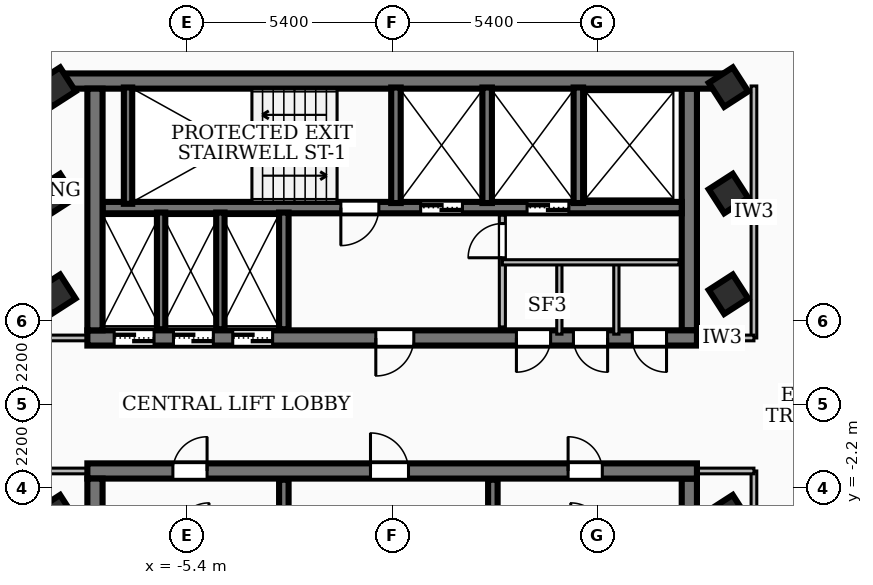
"""IFC4 building model, lengths in metres.
Left out: names, types, materials, properties, quantities, classifications, styles, units other than length and angle.
Written with IfcOpenShell. Run it as: python <this file> out.ifc"""

import sys

from ifc_helpers import new_model, si_unit, direction, frame, frame_2d, origin, origin_2d, place, context, subcontext, project, spatial, rectangle, extrude, element, fill, save


model = new_model("IFC4")
c1 = context("Model", 3, precision=1e-05, world=origin(), true_north=direction((0.0, 1.0)))
c2 = subcontext(c1, "Body", "Model", "MODEL_VIEW")
j1 = project(units=[si_unit("LENGTHUNIT", "METRE"), si_unit("PLANEANGLEUNIT", "RADIAN")], contexts=[c1])
p1 = place(None, origin())
s1 = spatial("IfcSite", under=j1, at=p1, CompositionType="ELEMENT")
p2 = place(p1, origin())
s2 = spatial("IfcBuilding", under=s1, at=p2, CompositionType="ELEMENT")
p3 = place(p2, frame((0.0, 0.0, 215.46)))
s3 = spatial("IfcBuildingStorey", under=s2, at=p3, CompositionType="ELEMENT", Elevation=215.46)
p4 = place(p3, frame((-8.78, 8.51, 0.0), z_axis=(0.0, 0.0, 1.0), x_axis=(1.0, 0.0, 0.0)))
e1 = element("IfcWall", 1, at=p4, inside=s3, PredefinedType="SHEAR", context=c2, shape_type="SweptSolid", body=[
    extrude(rectangle(XDim=17.56, YDim=0.4, at=frame_2d((8.78, 0.0))), origin(), (0.0, 0.0, 1.0), 3.16),
])
p5 = place(p3, frame((8.02, 1.75, 0.0), z_axis=(0.0, 0.0, 1.0), x_axis=(-1.0, 0.0, 0.0)))
e2 = element("IfcWall", 2, at=p5, inside=s3, PredefinedType="SHEAR", context=c2, shape_type="SweptSolid", body=[
    extrude(rectangle(XDim=16.04, YDim=0.4, at=frame_2d((8.02, 0.0))), origin(), (0.0, 0.0, 1.0), 3.16),
])
p6 = place(p5, frame((7.45, 0.0, 0.0)))
e3 = element("IfcOpeningElement", 3, at=p6, cuts=e2, PredefinedType="OPENING", context=c2, shape_type="SweptSolid", body=[
    extrude(rectangle(XDim=1.0, YDim=2.1, at=frame_2d((0.5, 1.05))), frame((0.0, 0.21, 0.0), z_axis=(0.0, -1.0, 0.0), x_axis=(1.0, 0.0, 0.0)), (0.0, 0.0, 1.0), 0.42),
])
p7 = place(p5, frame((14.285, 0.0, 0.0)))
e4 = element("IfcOpeningElement", 4, at=p7, cuts=e2, PredefinedType="OPENING", context=c2, shape_type="SweptSolid", body=[
    extrude(rectangle(XDim=1.05, YDim=2.15, at=frame_2d((0.525, 1.075))), frame((0.0, 0.21, 0.0), z_axis=(0.0, -1.0, 0.0), x_axis=(1.0, 0.0, 0.0)), (0.0, 0.0, 1.0), 0.42),
])
p8 = place(p5, frame((12.725, 0.0, 0.0)))
e5 = element("IfcOpeningElement", 5, at=p8, cuts=e2, PredefinedType="OPENING", context=c2, shape_type="SweptSolid", body=[
    extrude(rectangle(XDim=1.05, YDim=2.15, at=frame_2d((0.525, 1.075))), frame((0.0, 0.21, 0.0), z_axis=(0.0, -1.0, 0.0), x_axis=(1.0, 0.0, 0.0)), (0.0, 0.0, 1.0), 0.42),
])
p9 = place(p5, frame((11.165, 0.0, 0.0)))
e6 = element("IfcOpeningElement", 6, at=p9, cuts=e2, PredefinedType="OPENING", context=c2, shape_type="SweptSolid", body=[
    extrude(rectangle(XDim=1.05, YDim=2.15, at=frame_2d((0.525, 1.075))), frame((0.0, 0.21, 0.0), z_axis=(0.0, -1.0, 0.0), x_axis=(1.0, 0.0, 0.0)), (0.0, 0.0, 1.0), 0.42),
])
p10 = place(p5, frame((3.85, 0.0, 0.0)))
e7 = element("IfcOpeningElement", 7, at=p10, cuts=e2, PredefinedType="OPENING", context=c2, shape_type="SweptSolid", body=[
    extrude(rectangle(XDim=0.9, YDim=2.06, at=frame_2d((0.45, 1.03))), frame((0.0, 0.21, 0.0), z_axis=(0.0, -1.0, 0.0), x_axis=(1.0, 0.0, 0.0)), (0.0, 0.0, 1.0), 0.42),
])
p11 = place(p5, frame((2.35, 0.0, 0.0)))
e8 = element("IfcOpeningElement", 8, at=p11, cuts=e2, PredefinedType="OPENING", context=c2, shape_type="SweptSolid", body=[
    extrude(rectangle(XDim=0.9, YDim=2.06, at=frame_2d((0.45, 1.03))), frame((0.0, 0.21, 0.0), z_axis=(0.0, -1.0, 0.0), x_axis=(1.0, 0.0, 0.0)), (0.0, 0.0, 1.0), 0.42),
])
p12 = place(p5, frame((0.8, 0.0, 0.0)))
e9 = element("IfcOpeningElement", 9, at=p12, cuts=e2, PredefinedType="OPENING", context=c2, shape_type="SweptSolid", body=[
    extrude(rectangle(XDim=0.9, YDim=2.06, at=frame_2d((0.45, 1.03))), frame((0.0, 0.21, 0.0), z_axis=(0.0, -1.0, 0.0), x_axis=(1.0, 0.0, 0.0)), (0.0, 0.0, 1.0), 0.42),
])
for number, where, z_axis, x_axis in (
    (10, (-7.82, 1.95, 0.0), (0.0, 0.0, 1.0), (0.0, 1.0, 0.0)),
    (11, (7.82, 8.31, 0.0), (0.0, 0.0, 1.0), (0.0, -1.0, 0.0)),
):
    element("IfcWall", number, at=place(p3, frame(where, z_axis=z_axis, x_axis=x_axis)), inside=s3, PredefinedType="SHEAR", context=c2, shape_type="SweptSolid", body=[
        extrude(rectangle(XDim=6.36, YDim=0.4, at=frame_2d((3.18, 0.0))), origin(), (0.0, 0.0, 1.0), 3.16),
    ])
p13 = place(p3, frame((7.62, 5.18, 0.0), z_axis=(0.0, 0.0, 1.0), x_axis=(-1.0, 0.0, 0.0)))
e12 = element("IfcWall", 12, at=p13, inside=s3, PredefinedType="SOLIDWALL", context=c2, shape_type="SweptSolid", body=[
    extrude(rectangle(XDim=15.24, YDim=0.3, at=frame_2d((7.62, 0.0))), origin(), (0.0, 0.0, 1.0), 3.16),
])
p14 = place(p13, frame((5.77, 0.0, 0.0)))
e13 = element("IfcOpeningElement", 13, at=p14, cuts=e12, PredefinedType="OPENING", context=c2, shape_type="SweptSolid", body=[
    extrude(rectangle(XDim=1.1, YDim=2.15, at=frame_2d((0.55, 1.075))), frame((0.0, 0.16, 0.0), z_axis=(0.0, -1.0, 0.0), x_axis=(1.0, 0.0, 0.0)), (0.0, 0.0, 1.0), 0.32),
])
p15 = place(p13, frame((2.97, 0.0, 0.0)))
e14 = element("IfcOpeningElement", 14, at=p15, cuts=e12, PredefinedType="OPENING", context=c2, shape_type="SweptSolid", body=[
    extrude(rectangle(XDim=1.1, YDim=2.15, at=frame_2d((0.55, 1.075))), frame((0.0, 0.16, 0.0), z_axis=(0.0, -1.0, 0.0), x_axis=(1.0, 0.0, 0.0)), (0.0, 0.0, 1.0), 0.32),
])
p16 = place(p13, frame((7.97, 0.0, 0.0)))
e15 = element("IfcOpeningElement", 15, at=p16, cuts=e12, PredefinedType="OPENING", context=c2, shape_type="SweptSolid", body=[
    extrude(rectangle(XDim=1.0, YDim=2.1, at=frame_2d((0.5, 1.05))), frame((0.0, 0.16, 0.0), z_axis=(0.0, -1.0, 0.0), x_axis=(1.0, 0.0, 0.0)), (0.0, 0.0, 1.0), 0.32),
])
p17 = place(p3, frame((-8.02, -1.75, 0.0), z_axis=(0.0, 0.0, 1.0), x_axis=(1.0, 0.0, 0.0)))
e16 = element("IfcWall", 16, at=p17, inside=s3, PredefinedType="SHEAR", context=c2, shape_type="SweptSolid", body=[
    extrude(rectangle(XDim=16.04, YDim=0.4, at=frame_2d((8.02, 0.0))), origin(), (0.0, 0.0, 1.0), 3.16),
])
p18 = place(p17, frame((7.45, 0.0, 0.0)))
e17 = element("IfcOpeningElement", 17, at=p18, cuts=e16, PredefinedType="OPENING", context=c2, shape_type="SweptSolid", body=[
    extrude(rectangle(XDim=1.0, YDim=2.1, at=frame_2d((0.5, 1.05))), frame((0.0, 0.21, 0.0), z_axis=(0.0, -1.0, 0.0), x_axis=(1.0, 0.0, 0.0)), (0.0, 0.0, 1.0), 0.42),
])
p19 = place(p17, frame((12.65, 0.0, 0.0)))
e18 = element("IfcOpeningElement", 18, at=p19, cuts=e16, PredefinedType="OPENING", context=c2, shape_type="SweptSolid", body=[
    extrude(rectangle(XDim=0.9, YDim=2.06, at=frame_2d((0.45, 1.03))), frame((0.0, 0.21, 0.0), z_axis=(0.0, -1.0, 0.0), x_axis=(1.0, 0.0, 0.0)), (0.0, 0.0, 1.0), 0.42),
])
p20 = place(p17, frame((2.25, 0.0, 0.0)))
e19 = element("IfcOpeningElement", 19, at=p20, cuts=e16, PredefinedType="OPENING", context=c2, shape_type="SweptSolid", body=[
    extrude(rectangle(XDim=0.9, YDim=2.06, at=frame_2d((0.45, 1.03))), frame((0.0, 0.21, 0.0), z_axis=(0.0, -1.0, 0.0), x_axis=(1.0, 0.0, 0.0)), (0.0, 0.0, 1.0), 0.42),
])
for number, where, z_axis, x_axis in (
    (20, (-7.82, -8.31, 0.0), (0.0, 0.0, 1.0), (0.0, 1.0, 0.0)),
    (21, (7.82, -1.95, 0.0), (0.0, 0.0, 1.0), (0.0, -1.0, 0.0)),
):
    element("IfcWall", number, at=place(p3, frame(where, z_axis=z_axis, x_axis=x_axis)), inside=s3, PredefinedType="SHEAR", context=c2, shape_type="SweptSolid", body=[
        extrude(rectangle(XDim=6.36, YDim=0.4, at=frame_2d((3.18, 0.0))), origin(), (0.0, 0.0, 1.0), 3.16),
    ])
p21 = place(p3, frame((-6.95, 5.28, 0.0), z_axis=(0.0, 0.0, 1.0), x_axis=(0.0, 1.0, 0.0)))
e22 = element("IfcWall", 22, at=p21, inside=s3, PredefinedType="SOLIDWALL", context=c2, shape_type="SweptSolid", body=[
    extrude(rectangle(XDim=3.06, YDim=0.22, at=frame_2d((1.53, 0.0))), origin(), (0.0, 0.0, 1.0), 3.16),
])
for number, where, z_axis, x_axis in (
    (23, (0.1, 5.3, 0.0), (0.0, 0.0, 1.0), (0.0, 1.0, 0.0)),
    (24, (2.5, 5.3, 0.0), (0.0, 0.0, 1.0), (0.0, 1.0, 0.0)),
    (25, (4.9, 5.3, 0.0), (0.0, 0.0, 1.0), (0.0, 1.0, 0.0)),
):
    element("IfcWall", number, at=place(p3, frame(where, z_axis=z_axis, x_axis=x_axis)), inside=s3, PredefinedType="SOLIDWALL", context=c2, shape_type="SweptSolid", body=[
        extrude(rectangle(XDim=3.04, YDim=0.25, at=frame_2d((1.52, 0.0))), origin(), (0.0, 0.0, 1.0), 3.16),
    ])
for number, where, z_axis, x_axis in (
    (26, (-2.85, 1.98, 0.0), (0.0, 0.0, 1.0), (0.0, 1.0, 0.0)),
    (27, (-2.85, -5.05, 0.0), (0.0, 0.0, 1.0), (0.0, 1.0, 0.0)),
    (28, (2.65, -5.05, 0.0), (0.0, 0.0, 1.0), (0.0, 1.0, 0.0)),
):
    element("IfcWall", number, at=place(p3, frame(where, z_axis=z_axis, x_axis=x_axis)), inside=s3, PredefinedType="SOLIDWALL", context=c2, shape_type="SweptSolid", body=[
        extrude(rectangle(XDim=3.07, YDim=0.25, at=frame_2d((1.535, 0.0))), origin(), (0.0, 0.0, 1.0), 3.16),
    ])
for number, where, z_axis, x_axis in (
    (29, (-6.08, 1.98, 0.0), (0.0, 0.0, 1.0), (0.0, 1.0, 0.0)),
    (30, (-4.52, 1.98, 0.0), (0.0, 0.0, 1.0), (0.0, 1.0, 0.0)),
):
    element("IfcWall", number, at=place(p3, frame(where, z_axis=z_axis, x_axis=x_axis)), inside=s3, PredefinedType="SOLIDWALL", context=c2, shape_type="SweptSolid", body=[
        extrude(rectangle(XDim=3.07, YDim=0.22, at=frame_2d((1.535, 0.0))), origin(), (0.0, 0.0, 1.0), 3.16),
    ])
for number, where, z_axis, x_axis in (
    (31, (-8.85, -2.9, 0.0), (0.0, 0.0, 1.0), (0.841, 0.542, 0.0)),
    (32, (-8.85, 2.9, 0.0), (0.0, 0.0, 1.0), (0.841, 0.542, 0.0)),
    (33, (-8.85, 5.55, 0.0), (0.0, 0.0, 1.0), (0.841, 0.542, 0.0)),
    (34, (8.85, -2.9, 0.0), (0.0, 0.0, 1.0), (0.841, 0.542, 0.0)),
    (35, (8.85, 2.9, 0.0), (0.0, 0.0, 1.0), (0.841, 0.542, 0.0)),
    (36, (8.85, 5.55, 0.0), (0.0, 0.0, 1.0), (0.841, 0.542, 0.0)),
    (37, (-8.85, 8.35, 0.0), (0.0, 0.0, 1.0), (0.841, 0.542, 0.0)),
    (38, (8.85, 8.35, 0.0), (0.0, 0.0, 1.0), (0.841, 0.542, 0.0)),
):
    element("IfcColumn", number, at=place(p3, frame(where, z_axis=z_axis, x_axis=x_axis)), inside=s3, PredefinedType="COLUMN", context=c2, shape_type="SweptSolid", body=[
        extrude(rectangle(XDim=0.75, YDim=0.75, at=origin_2d()), origin(), (0.0, 0.0, 1.0), 3.42),
    ])
p22 = place(p3, frame((2.9, 2.04, 0.0), z_axis=(0.0, 0.0, 1.0), x_axis=(0.0, 1.0, 0.0)))
e39 = element("IfcWall", 39, at=p22, inside=s3, PredefinedType="PARTITIONING", context=c2, shape_type="SweptSolid", body=[
    extrude(rectangle(XDim=2.94, YDim=0.16, at=frame_2d((1.47, 0.0))), origin(), (0.0, 0.0, 1.0), 2.39),
])
p23 = place(p22, frame((1.82, 0.0, 0.0)))
e40 = element("IfcOpeningElement", 40, at=p23, cuts=e39, PredefinedType="OPENING", context=c2, shape_type="SweptSolid", body=[
    extrude(rectangle(XDim=0.9, YDim=2.06, at=frame_2d((0.45, 1.03))), frame((0.0, 0.09, 0.0), z_axis=(0.0, -1.0, 0.0), x_axis=(1.0, 0.0, 0.0)), (0.0, 0.0, 1.0), 0.18),
])
p24 = place(p3, frame((2.9, 3.74, 0.0), z_axis=(0.0, 0.0, 1.0), x_axis=(1.0, 0.0, 0.0)))
e41 = element("IfcWall", 41, at=p24, inside=s3, PredefinedType="PARTITIONING", context=c2, shape_type="SweptSolid", body=[
    extrude(rectangle(XDim=4.65, YDim=0.138, at=frame_2d((2.325, 0.0))), origin(), (0.0, 0.0, 1.0), 3.16),
])
for number, where, z_axis, x_axis in (
    (42, (4.4, 1.85, 0.0), (0.0, 0.0, 1.0), (0.0, 1.0, 0.0)),
    (43, (5.9, 1.85, 0.0), (0.0, 0.0, 1.0), (0.0, 1.0, 0.0)),
):
    element("IfcWall", number, at=place(p3, frame(where, z_axis=z_axis, x_axis=x_axis)), inside=s3, PredefinedType="PARTITIONING", context=c2, shape_type="SweptSolid", body=[
        extrude(rectangle(XDim=1.89, YDim=0.138, at=frame_2d((0.945, 0.0))), origin(), (0.0, 0.0, 1.0), 2.39),
    ])
for number, where, z_axis, x_axis in (
    (44, (-7.85, 1.75, 0.0), (0.0, 0.0, 1.0), (-1.0, 0.0, 0.0)),
    (45, (-7.85, -1.75, 0.0), (0.0, 0.0, 1.0), (-1.0, 0.0, 0.0)),
):
    element("IfcWall", number, at=place(p3, frame(where, z_axis=z_axis, x_axis=x_axis)), inside=s3, PredefinedType="PARTITIONING", context=c2, shape_type="SweptSolid", body=[
        extrude(rectangle(XDim=1.67, YDim=0.15, at=frame_2d((0.835, 0.0))), origin(), (0.0, 0.0, 1.0), 2.39),
    ])
p25 = place(p3, frame((9.52, 1.75, 0.0), z_axis=(0.0, 0.0, 1.0), x_axis=(0.0, 1.0, 0.0)))
e46 = element("IfcWall", 46, at=p25, inside=s3, PredefinedType="PARTITIONING", context=c2, shape_type="SweptSolid", body=[
    extrude(rectangle(XDim=6.63, YDim=0.15, at=frame_2d((3.315, 0.0))), origin(), (0.0, 0.0, 1.0), 2.53),
])
p26 = place(p3, frame((7.85, 1.75, 0.0), z_axis=(0.0, 0.0, 1.0), x_axis=(1.0, 0.0, 0.0)))
e47 = element("IfcWall", 47, at=p26, inside=s3, PredefinedType="PARTITIONING", context=c2, shape_type="SweptSolid", body=[
    extrude(rectangle(XDim=1.67, YDim=0.15, at=frame_2d((0.835, 0.0))), origin(), (0.0, 0.0, 1.0), 2.39),
])
p27 = place(p3, frame((9.52, -8.38, 0.0), z_axis=(0.0, 0.0, 1.0), x_axis=(0.0, 1.0, 0.0)))
e48 = element("IfcWall", 48, at=p27, inside=s3, PredefinedType="PARTITIONING", context=c2, shape_type="SweptSolid", body=[
    extrude(rectangle(XDim=6.63, YDim=0.15, at=frame_2d((3.315, 0.0))), origin(), (0.0, 0.0, 1.0), 3.16),
])
p28 = place(p3, frame((7.85, -1.75, 0.0), z_axis=(0.0, 0.0, 1.0), x_axis=(1.0, 0.0, 0.0)))
e49 = element("IfcWall", 49, at=p28, inside=s3, PredefinedType="PARTITIONING", context=c2, shape_type="SweptSolid", body=[
    extrude(rectangle(XDim=1.67, YDim=0.15, at=frame_2d((0.835, 0.0))), origin(), (0.0, 0.0, 1.0), 2.39),
])
p29 = place(p3, frame((11.27, 8.893, 0.0), z_axis=(0.0, 0.0, 1.0), x_axis=(-0.541761070726, 0.840532534912, 0.0)))
e50 = element("IfcWall", 50, at=p29, inside=s3, PredefinedType="PARTITIONING", context=c2, shape_type="SweptSolid", body=[
    extrude(rectangle(XDim=8.149, YDim=0.1, at=frame_2d((4.075, 0.0))), origin(), (0.0, 0.0, 1.0), 2.53),
])
p30 = place(p3, frame((10.449, 14.152, 0.0), z_axis=(0.0, 0.0, 1.0), x_axis=(0.541734007753, -0.8405499776, 0.0)))
e51 = element("IfcWall", 51, at=p30, inside=s3, PredefinedType="PARTITIONING", context=c2, shape_type="SweptSolid", body=[
    extrude(rectangle(XDim=12.67, YDim=0.1, at=frame_2d((6.335, 0.0))), origin(), (0.0, 0.0, 1.0), 2.53),
])
p31 = place(p30, frame((6.405, 0.0, 0.0)))
e52 = element("IfcOpeningElement", 52, at=p31, cuts=e51, PredefinedType="OPENING", context=c2, shape_type="SweptSolid", body=[
    extrude(rectangle(XDim=0.86, YDim=2.04, at=frame_2d((0.43, 1.02))), frame((0.0, 0.06, 0.0), z_axis=(0.0, -1.0, 0.0), x_axis=(1.0, 0.0, 0.0)), (0.0, 0.0, 1.0), 0.12),
])
p32 = place(p30, frame((5.205, 0.0, 0.0)))
e53 = element("IfcOpeningElement", 53, at=p32, cuts=e51, PredefinedType="OPENING", context=c2, shape_type="SweptSolid", body=[
    extrude(rectangle(XDim=0.86, YDim=2.04, at=frame_2d((0.43, 1.02))), frame((0.0, 0.06, 0.0), z_axis=(0.0, -1.0, 0.0), x_axis=(1.0, 0.0, 0.0)), (0.0, 0.0, 1.0), 0.12),
])
p33 = place(p3, frame((-16.331, 6.476, 0.0), z_axis=(0.0, 0.0, 1.0), x_axis=(0.840579457381, 0.541688264437, 0.0)))
e54 = element("IfcWall", 54, at=p33, inside=s3, PredefinedType="PARTITIONING", context=c2, shape_type="SweptSolid", body=[
    extrude(rectangle(XDim=20.238, YDim=0.1, at=frame_2d((10.119, 0.0))), origin(), (0.0, 0.0, 1.0), 2.53),
])
p34 = place(p33, frame((9.619, 0.0, 0.0)))
e55 = element("IfcOpeningElement", 55, at=p34, cuts=e54, PredefinedType="OPENING", context=c2, shape_type="SweptSolid", body=[
    extrude(rectangle(XDim=1.2, YDim=2.1, at=frame_2d((0.6, 1.05))), frame((0.0, 0.06, 0.0), z_axis=(0.0, -1.0, 0.0), x_axis=(1.0, 0.0, 0.0)), (0.0, 0.0, 1.0), 0.12),
])
p35 = place(p6, origin())
e56 = element("IfcDoor", 56, at=p35, inside=s3, OperationType="SINGLE_SWING_RIGHT", PredefinedType="DOOR", context=c2, shape_type="SweptSolid", body=[
    extrude(rectangle(XDim=1.0, YDim=2.1, at=frame_2d((0.5, 1.05))), frame((0.0, 0.025, 0.0), z_axis=(0.0, -1.0, 0.0), x_axis=(1.0, 0.0, 0.0)), (0.0, 0.0, 1.0), 0.05),
])
fill(e3, e56)
p36 = place(p18, origin())
e57 = element("IfcDoor", 57, at=p36, inside=s3, OperationType="SINGLE_SWING_LEFT", PredefinedType="DOOR", context=c2, shape_type="SweptSolid", body=[
    extrude(rectangle(XDim=1.0, YDim=2.1, at=frame_2d((0.5, 1.05))), frame((0.0, 0.025, 0.0), z_axis=(0.0, -1.0, 0.0), x_axis=(1.0, 0.0, 0.0)), (0.0, 0.0, 1.0), 0.05),
])
fill(e17, e57)
p37 = place(p14, origin())
e58 = element("IfcDoor", 58, at=p37, inside=s3, OperationType="DOUBLE_DOOR_SLIDING", PredefinedType="DOOR", context=c2, shape_type="SweptSolid", body=[
    extrude(rectangle(XDim=1.1, YDim=2.15, at=frame_2d((0.55, 1.075))), frame((0.0, 0.025, 0.0), z_axis=(0.0, -1.0, 0.0), x_axis=(1.0, 0.0, 0.0)), (0.0, 0.0, 1.0), 0.05),
])
fill(e13, e58)
p38 = place(p15, origin())
e59 = element("IfcDoor", 59, at=p38, inside=s3, OperationType="DOUBLE_DOOR_SLIDING", PredefinedType="DOOR", context=c2, shape_type="SweptSolid", body=[
    extrude(rectangle(XDim=1.1, YDim=2.15, at=frame_2d((0.55, 1.075))), frame((0.0, 0.025, 0.0), z_axis=(0.0, -1.0, 0.0), x_axis=(1.0, 0.0, 0.0)), (0.0, 0.0, 1.0), 0.05),
])
fill(e14, e59)
p39 = place(p16, origin())
e60 = element("IfcDoor", 60, at=p39, inside=s3, OperationType="SINGLE_SWING_RIGHT", PredefinedType="DOOR", context=c2, shape_type="SweptSolid", body=[
    extrude(rectangle(XDim=1.0, YDim=2.1, at=frame_2d((0.5, 1.05))), frame((0.0, 0.025, 0.0), z_axis=(0.0, -1.0, 0.0), x_axis=(1.0, 0.0, 0.0)), (0.0, 0.0, 1.0), 0.05),
])
fill(e15, e60)
p40 = place(p7, origin())
e61 = element("IfcDoor", 61, at=p40, inside=s3, OperationType="DOUBLE_DOOR_SLIDING", PredefinedType="DOOR", context=c2, shape_type="SweptSolid", body=[
    extrude(rectangle(XDim=1.05, YDim=2.15, at=frame_2d((0.525, 1.075))), frame((0.0, 0.025, 0.0), z_axis=(0.0, -1.0, 0.0), x_axis=(1.0, 0.0, 0.0)), (0.0, 0.0, 1.0), 0.05),
])
fill(e4, e61)
p41 = place(p8, origin())
e62 = element("IfcDoor", 62, at=p41, inside=s3, OperationType="DOUBLE_DOOR_SLIDING", PredefinedType="DOOR", context=c2, shape_type="SweptSolid", body=[
    extrude(rectangle(XDim=1.05, YDim=2.15, at=frame_2d((0.525, 1.075))), frame((0.0, 0.025, 0.0), z_axis=(0.0, -1.0, 0.0), x_axis=(1.0, 0.0, 0.0)), (0.0, 0.0, 1.0), 0.05),
])
fill(e5, e62)
p42 = place(p9, origin())
e63 = element("IfcDoor", 63, at=p42, inside=s3, OperationType="DOUBLE_DOOR_SLIDING", PredefinedType="DOOR", context=c2, shape_type="SweptSolid", body=[
    extrude(rectangle(XDim=1.05, YDim=2.15, at=frame_2d((0.525, 1.075))), frame((0.0, 0.025, 0.0), z_axis=(0.0, -1.0, 0.0), x_axis=(1.0, 0.0, 0.0)), (0.0, 0.0, 1.0), 0.05),
])
fill(e6, e63)
p43 = place(p19, origin())
e64 = element("IfcDoor", 64, at=p43, inside=s3, OperationType="SINGLE_SWING_LEFT", PredefinedType="DOOR", context=c2, shape_type="SweptSolid", body=[
    extrude(rectangle(XDim=0.9, YDim=2.06, at=frame_2d((0.45, 1.03))), frame((0.0, 0.025, 0.0), z_axis=(0.0, -1.0, 0.0), x_axis=(1.0, 0.0, 0.0)), (0.0, 0.0, 1.0), 0.05),
])
fill(e18, e64)
p44 = place(p20, origin())
e65 = element("IfcDoor", 65, at=p44, inside=s3, OperationType="SINGLE_SWING_RIGHT", PredefinedType="DOOR", context=c2, shape_type="SweptSolid", body=[
    extrude(rectangle(XDim=0.9, YDim=2.06, at=frame_2d((0.45, 1.03))), frame((0.0, 0.025, 0.0), z_axis=(0.0, -1.0, 0.0), x_axis=(1.0, 0.0, 0.0)), (0.0, 0.0, 1.0), 0.05),
])
fill(e19, e65)
p45 = place(p10, origin())
e66 = element("IfcDoor", 66, at=p45, inside=s3, OperationType="SINGLE_SWING_RIGHT", PredefinedType="DOOR", context=c2, shape_type="SweptSolid", body=[
    extrude(rectangle(XDim=0.9, YDim=2.06, at=frame_2d((0.45, 1.03))), frame((0.0, 0.025, 0.0), z_axis=(0.0, -1.0, 0.0), x_axis=(1.0, 0.0, 0.0)), (0.0, 0.0, 1.0), 0.05),
])
fill(e7, e66)
p46 = place(p11, origin())
e67 = element("IfcDoor", 67, at=p46, inside=s3, OperationType="SINGLE_SWING_LEFT", PredefinedType="DOOR", context=c2, shape_type="SweptSolid", body=[
    extrude(rectangle(XDim=0.9, YDim=2.06, at=frame_2d((0.45, 1.03))), frame((0.0, 0.025, 0.0), z_axis=(0.0, -1.0, 0.0), x_axis=(1.0, 0.0, 0.0)), (0.0, 0.0, 1.0), 0.05),
])
fill(e8, e67)
p47 = place(p12, origin())
e68 = element("IfcDoor", 68, at=p47, inside=s3, OperationType="SINGLE_SWING_LEFT", PredefinedType="DOOR", context=c2, shape_type="SweptSolid", body=[
    extrude(rectangle(XDim=0.9, YDim=2.06, at=frame_2d((0.45, 1.03))), frame((0.0, 0.025, 0.0), z_axis=(0.0, -1.0, 0.0), x_axis=(1.0, 0.0, 0.0)), (0.0, 0.0, 1.0), 0.05),
])
fill(e9, e68)
p48 = place(p23, origin())
e69 = element("IfcDoor", 69, at=p48, inside=s3, OperationType="SINGLE_SWING_LEFT", PredefinedType="DOOR", context=c2, shape_type="SweptSolid", body=[
    extrude(rectangle(XDim=0.9, YDim=2.06, at=frame_2d((0.45, 1.03))), frame((0.0, 0.025, 0.0), z_axis=(0.0, -1.0, 0.0), x_axis=(1.0, 0.0, 0.0)), (0.0, 0.0, 1.0), 0.05),
])
fill(e40, e69)
save(model, sys.argv[1])
